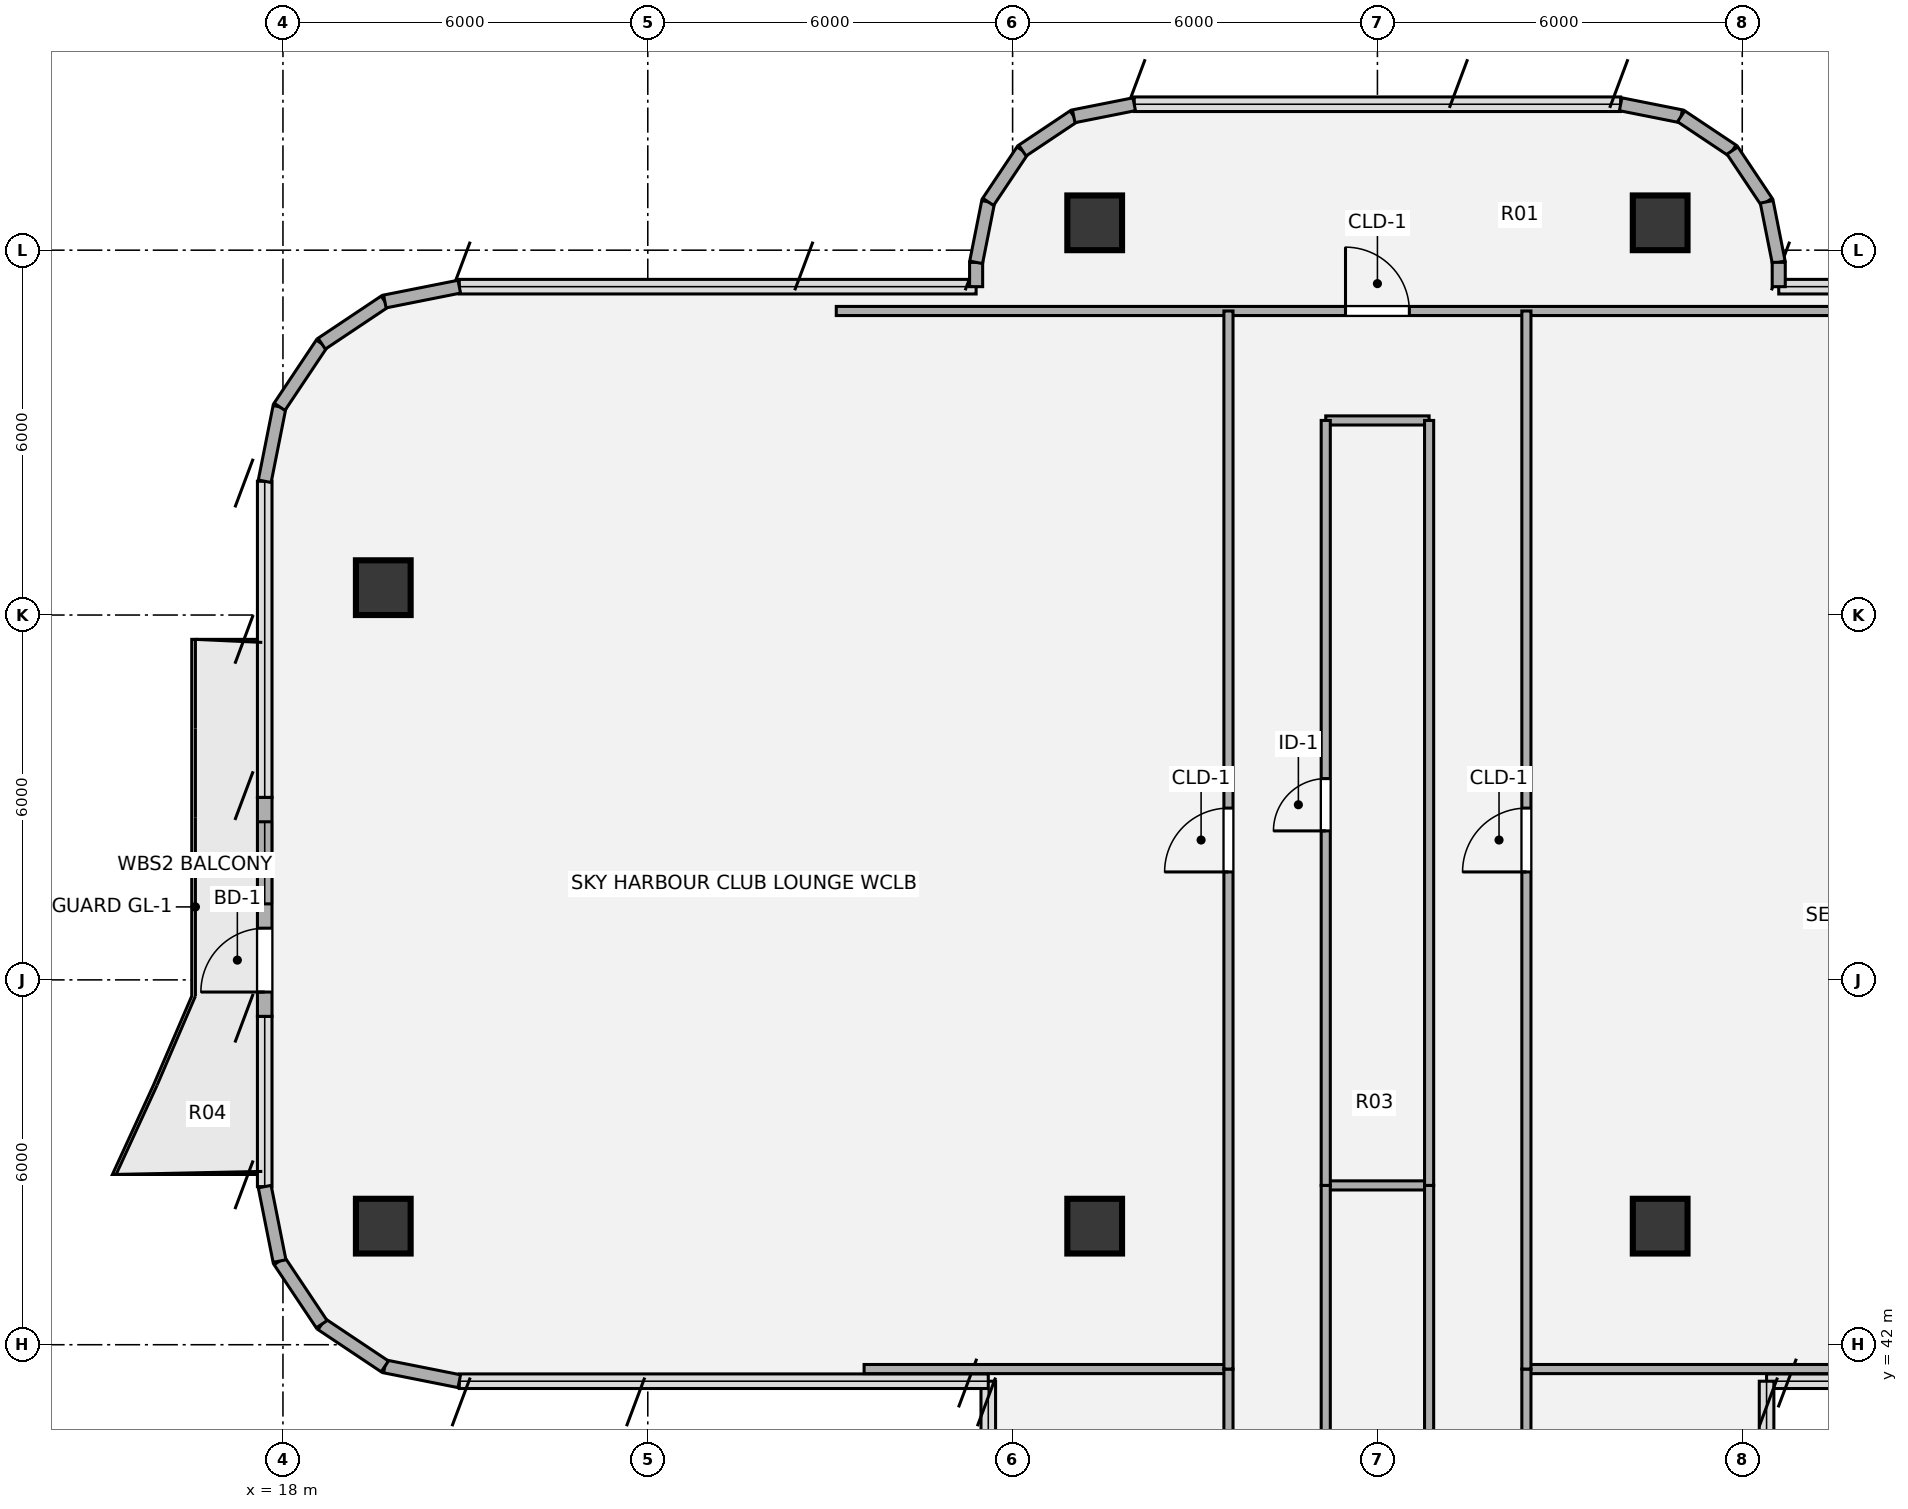
"""IFC4 building model, lengths in metres.
Left out: names, types, materials, properties, quantities, classifications, styles, units other than length and angle.
Written with IfcOpenShell. Run it as: python <this file> out.ifc"""

import sys

from ifc_helpers import new_model, si_unit, direction, frame, frame_2d, origin, origin_2d, place, context, subcontext, project, spatial, rectangle, hollow_circle, extrude, source, transform, mapped, element, fill, save


model = new_model("IFC4")
c1 = context("Model", 3, precision=1e-05, world=origin(), true_north=direction((0.0, 1.0)))
c2 = subcontext(c1, "Body", "Model", "MODEL_VIEW")
j1 = project(units=[si_unit("LENGTHUNIT", "METRE"), si_unit("PLANEANGLEUNIT", "RADIAN")], contexts=[c1])
p1 = place(None, origin())
s1 = spatial("IfcSite", under=j1, at=p1, CompositionType="ELEMENT")
p2 = place(p1, origin())
s2 = spatial("IfcBuilding", under=s1, at=p2, CompositionType="ELEMENT")
p3 = place(p2, frame((0.0, 0.0, 253.26)))
s3 = spatial("IfcBuildingStorey", under=s2, at=p3, CompositionType="ELEMENT", Elevation=253.26)
m1 = source(origin(), c2, "Body", "SweptSolid", [
    extrude(hollow_circle(Radius=0.45, WallThickness=0.032, at=origin_2d()), origin(), (0.0, 0.0, 1.0), 3.78),
])
for number, where, z_axis, x_axis in (
    (1, (19.65, 43.95, 0.0), (0.0, 0.0, 1.0), (1.0, 0.0, 0.0)),
    (2, (19.65, 54.45, 0.0), (0.0, 0.0, 1.0), (1.0, 0.0, 0.0)),
    (3, (31.35, 43.95, 0.0), (0.0, 0.0, 1.0), (1.0, 0.0, 0.0)),
    (4, (40.65, 43.95, 0.0), (0.0, 0.0, 1.0), (1.0, 0.0, 0.0)),
    (5, (31.35, 60.45, 0.0), (0.0, 0.0, 1.0), (1.0, 0.0, 0.0)),
    (6, (40.65, 60.45, 0.0), (0.0, 0.0, 1.0), (1.0, 0.0, 0.0)),
):
    element("IfcColumn", number, at=place(p3, frame(where, z_axis=z_axis, x_axis=x_axis)), inside=s3, PredefinedType="COLUMN", context=c2, shape_type="MappedRepresentation", body=[
        mapped(m1, transform((0.0, 0.0, 0.0), x_axis=(1.0, 0.0, 0.0), y_axis=(0.0, 1.0, 0.0), z_axis=(0.0, 0.0, 1.0), scale=1.0)),
    ])
for number, where, z_axis, x_axis in (
    (7, (20.9, 41.4, 0.0), (0.0, 0.0, 1.0), (-0.981, 0.195, 0.0)),
    (8, (19.675, 41.644, 0.0), (0.0, 0.0, 1.0), (-0.831, 0.556, 0.0)),
    (9, (18.637, 42.337, 0.0), (0.0, 0.0, 1.0), (-0.556, 0.831, 0.0)),
    (10, (17.944, 43.375, 0.0), (0.0, 0.0, 1.0), (-0.195, 0.981, 0.0)),
):
    element("IfcWall", number, at=place(p3, frame(where, z_axis=z_axis, x_axis=x_axis)), inside=s3, PredefinedType="SOLIDWALL", context=c2, shape_type="SweptSolid", body=[
        extrude(rectangle(XDim=1.249, YDim=0.215, at=frame_2d((0.624, 0.0))), origin(), (0.0, 0.0, 1.0), 3.53),
    ])
p4 = place(p3, frame((17.7, 47.4, 0.0), z_axis=(0.0, 0.0, 1.0), x_axis=(0.0, 1.0, 0.0)))
e11 = element("IfcWall", 11, at=p4, inside=s3, PredefinedType="SOLIDWALL", context=c2, shape_type="SweptSolid", body=[
    extrude(rectangle(XDim=3.6, YDim=0.24, at=frame_2d((1.8, 0.0))), origin(), (0.0, 0.0, 1.0), 3.53),
])
p5 = place(p4, frame((0.4, 0.0, 0.0)))
e12 = element("IfcOpeningElement", 12, at=p5, cuts=e11, PredefinedType="OPENING", context=c2, shape_type="SweptSolid", body=[
    extrude(rectangle(XDim=1.05, YDim=2.15, at=origin_2d()), frame((0.525, 0.13, 1.075), z_axis=(0.0, -1.0, 0.0), x_axis=(1.0, 0.0, 0.0)), (0.0, 0.0, 1.0), 0.26),
])
p6 = place(p4, frame((1.85, 0.0, 0.85)))
e13 = element("IfcOpeningElement", 13, at=p6, cuts=e11, PredefinedType="OPENING", context=c2, shape_type="SweptSolid", body=[
    extrude(rectangle(XDim=1.35, YDim=1.35, at=origin_2d()), frame((0.675, 0.13, 0.675), z_axis=(0.0, -1.0, 0.0), x_axis=(1.0, 0.0, 0.0)), (0.0, 0.0, 1.0), 0.26),
])
for number, where, z_axis, x_axis in (
    (14, (17.7, 56.2, 0.0), (0.0, 0.0, 1.0), (0.195, 0.981, 0.0)),
    (15, (17.944, 57.425, 0.0), (0.0, 0.0, 1.0), (0.556, 0.831, 0.0)),
    (16, (18.637, 58.463, 0.0), (0.0, 0.0, 1.0), (0.831, 0.556, 0.0)),
    (17, (19.675, 59.156, 0.0), (0.0, 0.0, 1.0), (0.981, 0.195, 0.0)),
):
    element("IfcWall", number, at=place(p3, frame(where, z_axis=z_axis, x_axis=x_axis)), inside=s3, PredefinedType="SOLIDWALL", context=c2, shape_type="SweptSolid", body=[
        extrude(rectangle(XDim=1.249, YDim=0.215, at=frame_2d((0.624, 0.0))), origin(), (0.0, 0.0, 1.0), 3.53),
    ])
p7 = place(p3, frame((29.4, 59.4, 0.0), z_axis=(0.0, 0.0, 1.0), x_axis=(0.0, 1.0, 0.0)))
e18 = element("IfcWall", 18, at=p7, inside=s3, PredefinedType="SOLIDWALL", context=c2, shape_type="SweptSolid", body=[
    extrude(rectangle(XDim=0.4, YDim=0.215, at=frame_2d((0.2, 0.0))), origin(), (0.0, 0.0, 1.0), 3.53),
])
p8 = place(p3, frame((29.4, 59.8, 0.0), z_axis=(0.0, 0.0, 1.0), x_axis=(0.195190360752, 0.980765376158, 0.0)))
e19 = element("IfcWall", 19, at=p8, inside=s3, PredefinedType="SOLIDWALL", context=c2, shape_type="SweptSolid", body=[
    extrude(rectangle(XDim=1.014, YDim=0.215, at=frame_2d((0.507, 0.0))), origin(), (0.0, 0.0, 1.0), 3.53),
])
p9 = place(p3, frame((29.598, 60.795, 0.0), z_axis=(0.0, 0.0, 1.0), x_axis=(0.555643898837, 0.831420385657, 0.0)))
e20 = element("IfcWall", 20, at=p9, inside=s3, PredefinedType="SOLIDWALL", context=c2, shape_type="SweptSolid", body=[
    extrude(rectangle(XDim=1.015, YDim=0.215, at=frame_2d((0.507, 0.0))), origin(), (0.0, 0.0, 1.0), 3.53),
])
p10 = place(p3, frame((30.162, 61.638, 0.0), z_axis=(0.0, 0.0, 1.0), x_axis=(0.831346067305, 0.555755086685, 0.0)))
e21 = element("IfcWall", 21, at=p10, inside=s3, PredefinedType="SOLIDWALL", context=c2, shape_type="SweptSolid", body=[
    extrude(rectangle(XDim=1.014, YDim=0.215, at=frame_2d((0.507, 0.0))), origin(), (0.0, 0.0, 1.0), 3.53),
])
for number, where, z_axis, x_axis in (
    (22, (31.005, 62.202, 0.0), (0.0, 0.0, 1.0), (0.981, 0.195, 0.0)),
    (23, (40.0, 62.4, 0.0), (0.0, 0.0, 1.0), (0.981, -0.195, 0.0)),
):
    element("IfcWall", number, at=place(p3, frame(where, z_axis=z_axis, x_axis=x_axis)), inside=s3, PredefinedType="SOLIDWALL", context=c2, shape_type="SweptSolid", body=[
        extrude(rectangle(XDim=1.015, YDim=0.215, at=frame_2d((0.507, 0.0))), origin(), (0.0, 0.0, 1.0), 3.53),
    ])
p11 = place(p3, frame((40.995, 62.202, 0.0), z_axis=(0.0, 0.0, 1.0), x_axis=(0.831346067305, -0.555755086685, 0.0)))
e24 = element("IfcWall", 24, at=p11, inside=s3, PredefinedType="SOLIDWALL", context=c2, shape_type="SweptSolid", body=[
    extrude(rectangle(XDim=1.014, YDim=0.215, at=frame_2d((0.507, 0.0))), origin(), (0.0, 0.0, 1.0), 3.53),
])
p12 = place(p3, frame((41.838, 61.638, 0.0), z_axis=(0.0, 0.0, 1.0), x_axis=(0.555643898837, -0.831420385657, 0.0)))
e25 = element("IfcWall", 25, at=p12, inside=s3, PredefinedType="SOLIDWALL", context=c2, shape_type="SweptSolid", body=[
    extrude(rectangle(XDim=1.015, YDim=0.215, at=frame_2d((0.507, 0.0))), origin(), (0.0, 0.0, 1.0), 3.53),
])
p13 = place(p3, frame((42.402, 60.795, 0.0), z_axis=(0.0, 0.0, 1.0), x_axis=(0.195190360752, -0.980765376158, 0.0)))
e26 = element("IfcWall", 26, at=p13, inside=s3, PredefinedType="SOLIDWALL", context=c2, shape_type="SweptSolid", body=[
    extrude(rectangle(XDim=1.014, YDim=0.215, at=frame_2d((0.507, 0.0))), origin(), (0.0, 0.0, 1.0), 3.53),
])
p14 = place(p3, frame((42.6, 59.8, 0.0), z_axis=(0.0, 0.0, 1.0), x_axis=(0.0, -1.0, 0.0)))
e27 = element("IfcWall", 27, at=p14, inside=s3, PredefinedType="SOLIDWALL", context=c2, shape_type="SweptSolid", body=[
    extrude(rectangle(XDim=0.4, YDim=0.215, at=frame_2d((0.2, 0.0))), origin(), (0.0, 0.0, 1.0), 3.53),
])
p15 = place(p3, frame((27.558, 41.6, 0.0), z_axis=(0.0, 0.0, 1.0), x_axis=(1.0, 0.0, 0.0)))
e28 = element("IfcWall", 28, at=p15, inside=s3, PredefinedType="PARTITIONING", context=c2, shape_type="SweptSolid", body=[
    extrude(rectangle(XDim=5.992, YDim=0.15, at=frame_2d((2.996, 0.0))), origin(), (0.0, 0.0, 1.0), 3.5),
])
p16 = place(p3, frame((38.45, 41.6, 0.0), z_axis=(0.0, 0.0, 1.0), x_axis=(1.0, 0.0, 0.0)))
e29 = element("IfcWall", 29, at=p16, inside=s3, PredefinedType="PARTITIONING", context=c2, shape_type="SweptSolid", body=[
    extrude(rectangle(XDim=5.993, YDim=0.15, at=frame_2d((2.997, 0.0))), origin(), (0.0, 0.0, 1.0), 3.5),
])
p17 = place(p3, frame((35.15, 44.62, 0.0), z_axis=(0.0, 0.0, 1.0), x_axis=(1.0, 0.0, 0.0)))
e30 = element("IfcWall", 30, at=p17, inside=s3, PredefinedType="PARTITIONING", context=c2, shape_type="SweptSolid", body=[
    extrude(rectangle(XDim=1.7, YDim=0.15, at=frame_2d((0.85, 0.0))), origin(), (0.0, 0.0, 1.0), 3.259),
])
p18 = place(p3, frame((35.15, 57.2, 0.0), z_axis=(0.0, 0.0, 1.0), x_axis=(1.0, 0.0, 0.0)))
e31 = element("IfcWall", 31, at=p18, inside=s3, PredefinedType="PARTITIONING", context=c2, shape_type="SweptSolid", body=[
    extrude(rectangle(XDim=1.7, YDim=0.15, at=frame_2d((0.85, 0.0))), origin(), (0.0, 0.0, 1.0), 3.308),
])
p19 = place(p3, frame((27.1, 59.0, 0.0), z_axis=(0.0, 0.0, 1.0), x_axis=(1.0, 0.0, 0.0)))
e32 = element("IfcWall", 32, at=p19, inside=s3, PredefinedType="PARTITIONING", context=c2, shape_type="SweptSolid", body=[
    extrude(rectangle(XDim=17.8, YDim=0.15, at=frame_2d((8.9, 0.0))), origin(), (0.0, 0.0, 1.0), 3.308),
])
p20 = place(p19, frame((8.375, 0.0, 0.0)))
e33 = element("IfcOpeningElement", 33, at=p20, cuts=e32, PredefinedType="OPENING", context=c2, shape_type="SweptSolid", body=[
    extrude(rectangle(XDim=1.05, YDim=2.1, at=origin_2d()), frame((0.525, 0.085, 1.05), z_axis=(0.0, -1.0, 0.0), x_axis=(1.0, 0.0, 0.0)), (0.0, 0.0, 1.0), 0.17),
])
p21 = place(p3, frame((33.55, 22.8, 0.0), z_axis=(0.0, 0.0, 1.0), x_axis=(0.0, 1.0, 0.0)))
e34 = element("IfcWall", 34, at=p21, inside=s3, PredefinedType="PARTITIONING", context=c2, shape_type="SweptSolid", body=[
    extrude(rectangle(XDim=18.8, YDim=0.15, at=frame_2d((9.4, 0.0))), origin(), (0.0, 0.0, 1.0), 3.5),
])
p22 = place(p21, frame((8.84, 0.0, 0.0)))
e35 = element("IfcOpeningElement", 35, at=p22, cuts=e34, PredefinedType="OPENING", context=c2, shape_type="SweptSolid", body=[
    extrude(rectangle(XDim=0.86, YDim=2.1, at=origin_2d()), frame((0.43, 0.085, 1.05), z_axis=(0.0, -1.0, 0.0), x_axis=(1.0, 0.0, 0.0)), (0.0, 0.0, 1.0), 0.17),
])
p23 = place(p3, frame((33.55, 41.6, 0.0), z_axis=(0.0, 0.0, 1.0), x_axis=(0.0, 1.0, 0.0)))
e36 = element("IfcWall", 36, at=p23, inside=s3, PredefinedType="PARTITIONING", context=c2, shape_type="SweptSolid", body=[
    extrude(rectangle(XDim=17.4, YDim=0.15, at=frame_2d((8.7, 0.0))), origin(), (0.0, 0.0, 1.0), 3.5),
])
p24 = place(p23, frame((8.175, 0.0, 0.0)))
e37 = element("IfcOpeningElement", 37, at=p24, cuts=e36, PredefinedType="OPENING", context=c2, shape_type="SweptSolid", body=[
    extrude(rectangle(XDim=1.05, YDim=2.1, at=origin_2d()), frame((0.525, 0.085, 1.05), z_axis=(0.0, -1.0, 0.0), x_axis=(1.0, 0.0, 0.0)), (0.0, 0.0, 1.0), 0.17),
])
p25 = place(p3, frame((35.15, 25.2, 0.0), z_axis=(0.0, 0.0, 1.0), x_axis=(0.0, 1.0, 0.0)))
e38 = element("IfcWall", 38, at=p25, inside=s3, PredefinedType="PARTITIONING", context=c2, shape_type="SweptSolid", body=[
    extrude(rectangle(XDim=19.42, YDim=0.15, at=frame_2d((9.71, 0.0))), origin(), (0.0, 0.0, 1.0), 3.5),
])
p26 = place(p3, frame((35.15, 44.62, 0.0), z_axis=(0.0, 0.0, 1.0), x_axis=(0.0, 1.0, 0.0)))
e39 = element("IfcWall", 39, at=p26, inside=s3, PredefinedType="PARTITIONING", context=c2, shape_type="SweptSolid", body=[
    extrude(rectangle(XDim=12.58, YDim=0.15, at=frame_2d((6.29, 0.0))), origin(), (0.0, 0.0, 1.0), 3.5),
])
p27 = place(p26, frame((5.83, 0.0, 0.0)))
e40 = element("IfcOpeningElement", 40, at=p27, cuts=e39, PredefinedType="OPENING", context=c2, shape_type="SweptSolid", body=[
    extrude(rectangle(XDim=0.86, YDim=2.1, at=origin_2d()), frame((0.43, 0.085, 1.05), z_axis=(0.0, -1.0, 0.0), x_axis=(1.0, 0.0, 0.0)), (0.0, 0.0, 1.0), 0.17),
])
p28 = place(p3, frame((36.85, 25.2, 0.0), z_axis=(0.0, 0.0, 1.0), x_axis=(0.0, 1.0, 0.0)))
e41 = element("IfcWall", 41, at=p28, inside=s3, PredefinedType="PARTITIONING", context=c2, shape_type="SweptSolid", body=[
    extrude(rectangle(XDim=19.42, YDim=0.15, at=frame_2d((9.71, 0.0))), origin(), (0.0, 0.0, 1.0), 3.5),
])
p29 = place(p28, frame((9.185, 0.0, 0.0)))
e42 = element("IfcOpeningElement", 42, at=p29, cuts=e41, PredefinedType="OPENING", context=c2, shape_type="SweptSolid", body=[
    extrude(rectangle(XDim=1.05, YDim=2.1, at=origin_2d()), frame((0.525, 0.085, 1.05), z_axis=(0.0, -1.0, 0.0), x_axis=(1.0, 0.0, 0.0)), (0.0, 0.0, 1.0), 0.17),
])
p30 = place(p3, frame((36.85, 44.62, 0.0), z_axis=(0.0, 0.0, 1.0), x_axis=(0.0, 1.0, 0.0)))
e43 = element("IfcWall", 43, at=p30, inside=s3, PredefinedType="PARTITIONING", context=c2, shape_type="SweptSolid", body=[
    extrude(rectangle(XDim=12.58, YDim=0.15, at=frame_2d((6.29, 0.0))), origin(), (0.0, 0.0, 1.0), 3.5),
])
p31 = place(p3, frame((38.45, 21.2, 0.0), z_axis=(0.0, 0.0, 1.0), x_axis=(0.0, 1.0, 0.0)))
e44 = element("IfcWall", 44, at=p31, inside=s3, PredefinedType="PARTITIONING", context=c2, shape_type="SweptSolid", body=[
    extrude(rectangle(XDim=20.4, YDim=0.15, at=frame_2d((10.2, 0.0))), origin(), (0.0, 0.0, 1.0), 3.5),
])
p32 = place(p31, frame((9.575, 0.0, 0.0)))
e45 = element("IfcOpeningElement", 45, at=p32, cuts=e44, PredefinedType="OPENING", context=c2, shape_type="SweptSolid", body=[
    extrude(rectangle(XDim=1.05, YDim=2.1, at=origin_2d()), frame((0.525, 0.085, 1.05), z_axis=(0.0, -1.0, 0.0), x_axis=(1.0, 0.0, 0.0)), (0.0, 0.0, 1.0), 0.17),
])
p33 = place(p3, frame((38.45, 41.6, 0.0), z_axis=(0.0, 0.0, 1.0), x_axis=(0.0, 1.0, 0.0)))
e46 = element("IfcWall", 46, at=p33, inside=s3, PredefinedType="PARTITIONING", context=c2, shape_type="SweptSolid", body=[
    extrude(rectangle(XDim=17.4, YDim=0.15, at=frame_2d((8.7, 0.0))), origin(), (0.0, 0.0, 1.0), 3.5),
])
p34 = place(p33, frame((8.175, 0.0, 0.0)))
e47 = element("IfcOpeningElement", 47, at=p34, cuts=e46, PredefinedType="OPENING", context=c2, shape_type="SweptSolid", body=[
    extrude(rectangle(XDim=1.05, YDim=2.1, at=origin_2d()), frame((0.525, 0.085, 1.05), z_axis=(0.0, -1.0, 0.0), x_axis=(1.0, 0.0, 0.0)), (0.0, 0.0, 1.0), 0.17),
])
m2 = source(origin(), c2, "Body", "SweptSolid", [
    extrude(rectangle(XDim=1.05, YDim=2.15, at=origin_2d()), frame((0.525, 0.025, 1.075), z_axis=(0.0, -1.0, 0.0), x_axis=(1.0, 0.0, 0.0)), (0.0, 0.0, 1.0), 0.05),
])
p35 = place(p5, origin())
e48 = element("IfcDoor", 48, at=p35, inside=s3, OperationType="SINGLE_SWING_LEFT", PredefinedType="DOOR", context=c2, shape_type="MappedRepresentation", body=[
    mapped(m2, transform((0.0, 0.0, 0.0), x_axis=(1.0, 0.0, 0.0), y_axis=(0.0, 1.0, 0.0), z_axis=(0.0, 0.0, 1.0), scale=1.0)),
])
fill(e12, e48)
m3 = source(origin(), c2, "Body", "SweptSolid", [
    extrude(rectangle(XDim=1.35, YDim=1.35, at=origin_2d()), frame((0.675, 0.03, 0.675), z_axis=(0.0, -1.0, 0.0), x_axis=(1.0, 0.0, 0.0)), (0.0, 0.0, 1.0), 0.06),
])
p36 = place(p6, origin())
e49 = element("IfcWindow", 49, at=p36, inside=s3, PartitioningType="SINGLE_PANEL", PredefinedType="WINDOW", context=c2, shape_type="MappedRepresentation", body=[
    mapped(m3, transform((0.0, 0.0, 0.0), x_axis=(1.0, 0.0, 0.0), y_axis=(0.0, 1.0, 0.0), z_axis=(0.0, 0.0, 1.0), scale=1.0)),
])
fill(e13, e49)
m4 = source(origin(), c2, "Body", "SweptSolid", [
    extrude(rectangle(XDim=1.05, YDim=2.1, at=origin_2d()), frame((0.525, 0.025, 1.05), z_axis=(0.0, -1.0, 0.0), x_axis=(1.0, 0.0, 0.0)), (0.0, 0.0, 1.0), 0.05),
])
p37 = place(p20, origin())
e50 = element("IfcDoor", 50, at=p37, inside=s3, OperationType="SINGLE_SWING_LEFT", PredefinedType="DOOR", context=c2, shape_type="MappedRepresentation", body=[
    mapped(m4, transform((0.0, 0.0, 0.0), x_axis=(1.0, 0.0, 0.0), y_axis=(0.0, 1.0, 0.0), z_axis=(0.0, 0.0, 1.0), scale=1.0)),
])
fill(e33, e50)
p38 = place(p24, origin())
e51 = element("IfcDoor", 51, at=p38, inside=s3, OperationType="SINGLE_SWING_LEFT", PredefinedType="DOOR", context=c2, shape_type="MappedRepresentation", body=[
    mapped(m4, transform((0.0, 0.0, 0.0), x_axis=(1.0, 0.0, 0.0), y_axis=(0.0, 1.0, 0.0), z_axis=(0.0, 0.0, 1.0), scale=1.0)),
])
fill(e37, e51)
m5 = source(origin(), c2, "Body", "SweptSolid", [
    extrude(rectangle(XDim=0.86, YDim=2.1, at=origin_2d()), frame((0.43, 0.025, 1.05), z_axis=(0.0, -1.0, 0.0), x_axis=(1.0, 0.0, 0.0)), (0.0, 0.0, 1.0), 0.05),
])
p39 = place(p27, origin())
e52 = element("IfcDoor", 52, at=p39, inside=s3, OperationType="SINGLE_SWING_LEFT", PredefinedType="DOOR", context=c2, shape_type="MappedRepresentation", body=[
    mapped(m5, transform((0.0, 0.0, 0.0), x_axis=(1.0, 0.0, 0.0), y_axis=(0.0, 1.0, 0.0), z_axis=(0.0, 0.0, 1.0), scale=1.0)),
])
fill(e40, e52)
p40 = place(p34, origin())
e53 = element("IfcDoor", 53, at=p40, inside=s3, OperationType="SINGLE_SWING_LEFT", PredefinedType="DOOR", context=c2, shape_type="MappedRepresentation", body=[
    mapped(m4, transform((0.0, 0.0, 0.0), x_axis=(1.0, 0.0, 0.0), y_axis=(0.0, 1.0, 0.0), z_axis=(0.0, 0.0, 1.0), scale=1.0)),
])
fill(e47, e53)
save(model, sys.argv[1])
